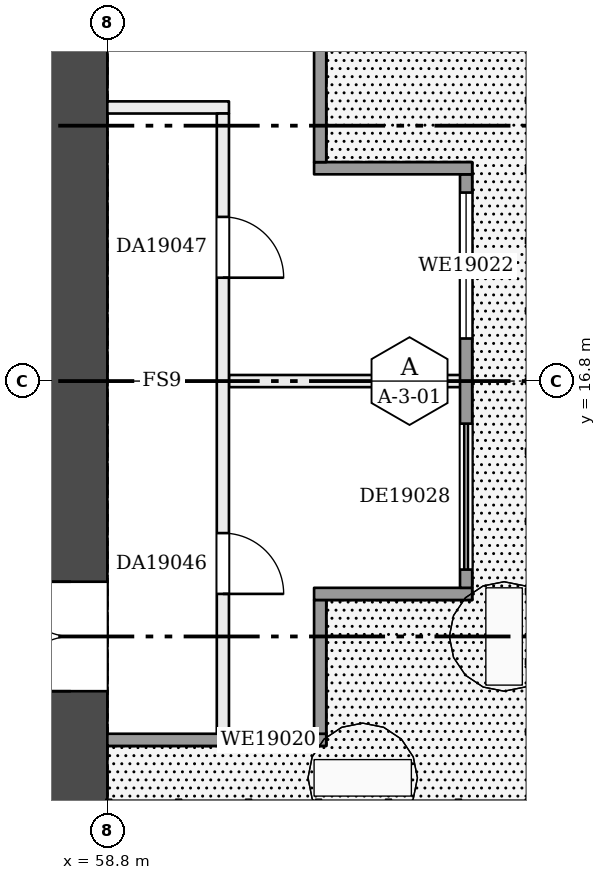
"""IFC4 building model, lengths in metres.
Left out: names, types, materials, properties, quantities, classifications, styles, units other than length and angle.
Written with IfcOpenShell. Run it as: python <this file> out.ifc"""

import sys

from ifc_helpers import new_model, si_unit, direction, frame, frame_2d, origin, place, context, subcontext, project, spatial, rectangle, extrude, element, fill, save


model = new_model("IFC4")
c1 = context("Model", 3, precision=1e-05, world=origin(), true_north=direction((0.0, 1.0)))
c2 = subcontext(c1, "Body", "Model", "MODEL_VIEW")
j1 = project(units=[si_unit("LENGTHUNIT", "METRE"), si_unit("PLANEANGLEUNIT", "RADIAN")], contexts=[c1])
p1 = place(None, origin())
s1 = spatial("IfcSite", under=j1, at=p1, CompositionType="ELEMENT")
p2 = place(p1, origin())
s2 = spatial("IfcBuilding", under=s1, at=p2, CompositionType="ELEMENT")
p3 = place(p2, frame((0.0, 0.0, 81.2)))
s3 = spatial("IfcBuildingStorey", under=s2, at=p3, CompositionType="ELEMENT", Elevation=81.2)
p4 = place(p3, frame((58.2, 9.6, 0.0), z_axis=(0.0, 0.0, 1.0), x_axis=(0.0, 1.0, 0.0)))
e1 = element("IfcWall", 1, at=p4, inside=s3, PredefinedType="SHEAR", context=c2, shape_type="SweptSolid", body=[
    extrude(rectangle(XDim=14.4, YDim=1.2, at=frame_2d((7.2, 0.0))), origin(), (0.0, 0.0, 1.0), 3.22),
])
p5 = place(p4, frame((2.1, 0.0, 0.0)))
e2 = element("IfcOpeningElement", 2, at=p5, cuts=e1, PredefinedType="OPENING", context=c2, shape_type="SweptSolid", body=[
    extrude(rectangle(XDim=1.8, YDim=2.1, at=frame_2d((0.9, 1.05))), frame((0.0, 0.61, 0.0), z_axis=(0.0, -1.0, 0.0), x_axis=(1.0, 0.0, 0.0)), (0.0, 0.0, 1.0), 1.22),
])
p6 = place(p3, frame((60.8, 16.8, 0.0), z_axis=(0.0, 0.0, 1.0), x_axis=(1.0, 0.0, 0.0)))
e3 = element("IfcWall", 3, at=p6, inside=s3, PredefinedType="PARTITIONING", context=c2, shape_type="SweptSolid", body=[
    extrude(rectangle(XDim=3.9, YDim=0.2, at=frame_2d((1.95, 0.0))), origin(), (0.0, 0.0, 1.0), 3.22),
])
p7 = place(p3, frame((58.8, 21.3, 0.0), z_axis=(0.0, 0.0, 1.0), x_axis=(1.0, 0.0, 0.0)))
e4 = element("IfcWall", 4, at=p7, inside=s3, PredefinedType="PARTITIONING", context=c2, shape_type="SweptSolid", body=[
    extrude(rectangle(XDim=2.0, YDim=0.2, at=frame_2d((1.0, 0.0))), origin(), (0.0, 0.0, 1.0), 3.22),
])
p8 = place(p3, frame((60.7, 10.9, 0.0), z_axis=(0.0, 0.0, 1.0), x_axis=(0.0, 1.0, 0.0)))
e5 = element("IfcWall", 5, at=p8, inside=s3, PredefinedType="PARTITIONING", context=c2, shape_type="SweptSolid", body=[
    extrude(rectangle(XDim=10.3, YDim=0.2, at=frame_2d((5.15, 0.0))), origin(), (0.0, 0.0, 1.0), 3.22),
])
p9 = place(p8, frame((2.4, 0.0, 0.0)))
e6 = element("IfcOpeningElement", 6, at=p9, cuts=e5, PredefinedType="OPENING", context=c2, shape_type="SweptSolid", body=[
    extrude(rectangle(XDim=1.0, YDim=2.1, at=frame_2d((0.5, 1.05))), frame((0.0, 0.11, 0.0), z_axis=(0.0, -1.0, 0.0), x_axis=(1.0, 0.0, 0.0)), (0.0, 0.0, 1.0), 0.22),
])
p10 = place(p8, frame((7.6, 0.0, 0.0)))
e7 = element("IfcOpeningElement", 7, at=p10, cuts=e5, PredefinedType="OPENING", context=c2, shape_type="SweptSolid", body=[
    extrude(rectangle(XDim=1.0, YDim=2.1, at=frame_2d((0.5, 1.05))), frame((0.0, 0.11, 0.0), z_axis=(0.0, -1.0, 0.0), x_axis=(1.0, 0.0, 0.0)), (0.0, 0.0, 1.0), 0.22),
])
p11 = place(p3, frame((58.8, 10.9, 0.0), z_axis=(0.0, 0.0, 1.0), x_axis=(1.0, 0.0, 0.0)))
e8 = element("IfcWall", 8, at=p11, inside=s3, PredefinedType="SOLIDWALL", context=c2, shape_type="SweptSolid", body=[
    extrude(rectangle(XDim=3.6, YDim=0.2, at=frame_2d((1.8, 0.0))), origin(), (0.0, 0.0, 1.0), 3.22),
])
p12 = place(p11, frame((2.0, 0.0, 0.9)))
e9 = element("IfcOpeningElement", 9, at=p12, cuts=e8, PredefinedType="OPENING", context=c2, shape_type="SweptSolid", body=[
    extrude(rectangle(XDim=1.3, YDim=1.5, at=frame_2d((0.65, 0.75))), frame((0.0, 0.11, 0.0), z_axis=(0.0, -1.0, 0.0), x_axis=(1.0, 0.0, 0.0)), (0.0, 0.0, 1.0), 0.22),
])
p13 = place(p3, frame((62.3, 11.0, 0.0), z_axis=(0.0, 0.0, 1.0), x_axis=(0.0, 1.0, 0.0)))
e10 = element("IfcWall", 10, at=p13, inside=s3, PredefinedType="SOLIDWALL", context=c2, shape_type="SweptSolid", body=[
    extrude(rectangle(XDim=2.2, YDim=0.2, at=frame_2d((1.1, 0.0))), origin(), (0.0, 0.0, 1.0), 3.22),
])
p14 = place(p3, frame((62.2, 13.3, 0.0), z_axis=(0.0, 0.0, 1.0), x_axis=(1.0, 0.0, 0.0)))
e11 = element("IfcWall", 11, at=p14, inside=s3, PredefinedType="SOLIDWALL", context=c2, shape_type="SweptSolid", body=[
    extrude(rectangle(XDim=2.6, YDim=0.2, at=frame_2d((1.3, 0.0))), origin(), (0.0, 0.0, 1.0), 3.22),
])
p15 = place(p3, frame((64.7, 13.4, 0.0), z_axis=(0.0, 0.0, 1.0), x_axis=(0.0, 1.0, 0.0)))
e12 = element("IfcWall", 12, at=p15, inside=s3, PredefinedType="SOLIDWALL", context=c2, shape_type="SweptSolid", body=[
    extrude(rectangle(XDim=6.8, YDim=0.2, at=frame_2d((3.4, 0.0))), origin(), (0.0, 0.0, 1.0), 3.22),
])
p16 = place(p15, frame((4.1, 0.0, 0.9)))
e13 = element("IfcOpeningElement", 13, at=p16, cuts=e12, PredefinedType="OPENING", context=c2, shape_type="SweptSolid", body=[
    extrude(rectangle(XDim=2.4, YDim=1.5, at=frame_2d((1.2, 0.75))), frame((0.0, 0.11, 0.0), z_axis=(0.0, -1.0, 0.0), x_axis=(1.0, 0.0, 0.0)), (0.0, 0.0, 1.0), 0.22),
])
p17 = place(p15, frame((0.3, 0.0, 0.0)))
e14 = element("IfcOpeningElement", 14, at=p17, cuts=e12, PredefinedType="OPENING", context=c2, shape_type="SweptSolid", body=[
    extrude(rectangle(XDim=2.4, YDim=2.2, at=frame_2d((1.2, 1.1))), frame((0.0, 0.11, 0.0), z_axis=(0.0, -1.0, 0.0), x_axis=(1.0, 0.0, 0.0)), (0.0, 0.0, 1.0), 0.22),
])
p18 = place(p3, frame((64.8, 20.3, 0.0), z_axis=(0.0, 0.0, 1.0), x_axis=(-1.0, 0.0, 0.0)))
e15 = element("IfcWall", 15, at=p18, inside=s3, PredefinedType="SOLIDWALL", context=c2, shape_type="SweptSolid", body=[
    extrude(rectangle(XDim=2.6, YDim=0.2, at=frame_2d((1.3, 0.0))), origin(), (0.0, 0.0, 1.0), 3.22),
])
p19 = place(p3, frame((62.3, 20.4, 0.0), z_axis=(0.0, 0.0, 1.0), x_axis=(0.0, 1.0, 0.0)))
e16 = element("IfcWall", 16, at=p19, inside=s3, PredefinedType="SOLIDWALL", context=c2, shape_type="SweptSolid", body=[
    extrude(rectangle(XDim=2.2, YDim=0.2, at=frame_2d((1.1, 0.0))), origin(), (0.0, 0.0, 1.0), 3.22),
])
p20 = place(p5, origin())
e17 = element("IfcDoor", 17, at=p20, inside=s3, OperationType="DOUBLE_DOOR_SINGLE_SWING", PredefinedType="DOOR", context=c2, shape_type="SweptSolid", body=[
    extrude(rectangle(XDim=1.8, YDim=2.1, at=frame_2d((0.9, 1.05))), frame((0.0, 0.025, 0.0), z_axis=(0.0, -1.0, 0.0), x_axis=(1.0, 0.0, 0.0)), (0.0, 0.0, 1.0), 0.05),
])
fill(e2, e17)
p21 = place(p9, frame((1.0, 0.0, 0.0), z_axis=(0.0, 0.0, 1.0), x_axis=(-1.0, 0.0, 0.0)))
e18 = element("IfcDoor", 18, at=p21, inside=s3, OperationType="SINGLE_SWING_RIGHT", PredefinedType="DOOR", context=c2, shape_type="SweptSolid", body=[
    extrude(rectangle(XDim=1.0, YDim=2.1, at=frame_2d((0.5, 1.05))), frame((0.0, 0.025, 0.0), z_axis=(0.0, -1.0, 0.0), x_axis=(1.0, 0.0, 0.0)), (0.0, 0.0, 1.0), 0.05),
])
fill(e6, e18)
p22 = place(p10, frame((1.0, 0.0, 0.0), z_axis=(0.0, 0.0, 1.0), x_axis=(-1.0, 0.0, 0.0)))
e19 = element("IfcDoor", 19, at=p22, inside=s3, OperationType="SINGLE_SWING_RIGHT", PredefinedType="DOOR", context=c2, shape_type="SweptSolid", body=[
    extrude(rectangle(XDim=1.0, YDim=2.1, at=frame_2d((0.5, 1.05))), frame((0.0, 0.025, 0.0), z_axis=(0.0, -1.0, 0.0), x_axis=(1.0, 0.0, 0.0)), (0.0, 0.0, 1.0), 0.05),
])
fill(e7, e19)
p23 = place(p12, origin())
e20 = element("IfcWindow", 20, at=p23, inside=s3, PartitioningType="SINGLE_PANEL", PredefinedType="WINDOW", context=c2, shape_type="SweptSolid", body=[
    extrude(rectangle(XDim=1.3, YDim=1.5, at=frame_2d((0.65, 0.75))), frame((0.0, 0.03, 0.0), z_axis=(0.0, -1.0, 0.0), x_axis=(1.0, 0.0, 0.0)), (0.0, 0.0, 1.0), 0.06),
])
fill(e9, e20)
p24 = place(p16, origin())
e21 = element("IfcWindow", 21, at=p24, inside=s3, PartitioningType="SINGLE_PANEL", PredefinedType="WINDOW", context=c2, shape_type="SweptSolid", body=[
    extrude(rectangle(XDim=2.4, YDim=1.5, at=frame_2d((1.2, 0.75))), frame((0.0, 0.03, 0.0), z_axis=(0.0, -1.0, 0.0), x_axis=(1.0, 0.0, 0.0)), (0.0, 0.0, 1.0), 0.06),
])
fill(e13, e21)
p25 = place(p17, origin())
e22 = element("IfcDoor", 22, at=p25, inside=s3, OperationType="DOUBLE_DOOR_SLIDING", PredefinedType="DOOR", context=c2, shape_type="SweptSolid", body=[
    extrude(rectangle(XDim=2.4, YDim=2.2, at=frame_2d((1.2, 1.1))), frame((0.0, 0.025, 0.0), z_axis=(0.0, -1.0, 0.0), x_axis=(1.0, 0.0, 0.0)), (0.0, 0.0, 1.0), 0.05),
])
fill(e14, e22)
save(model, sys.argv[1])
